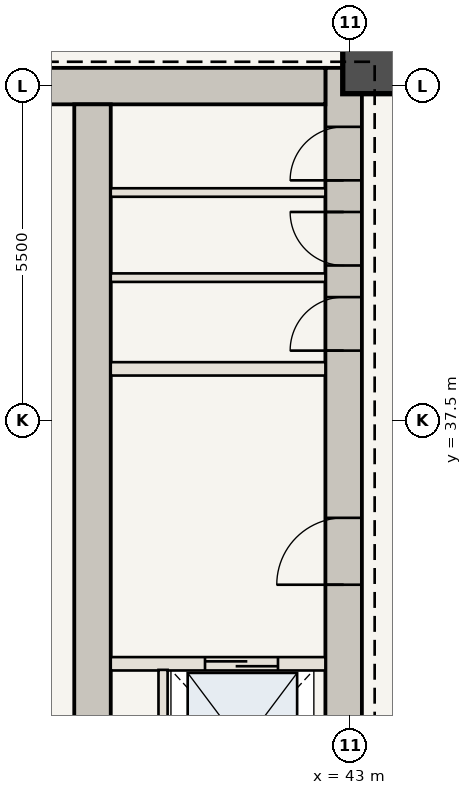
"""IFC4 building model, lengths in metres.
Left out: names, types, materials, properties, quantities, classifications, styles, units other than length and angle.
Written with IfcOpenShell. Run it as: python <this file> out.ifc"""

import sys

from ifc_helpers import new_model, si_unit, direction, frame, frame_2d, origin, origin_2d, place, context, subcontext, project, spatial, rectangle, extrude, element, fill, save


model = new_model("IFC4")
c1 = context("Model", 3, precision=1e-05, world=origin(), true_north=direction((0.0, 1.0)))
c2 = subcontext(c1, "Body", "Model", "MODEL_VIEW")
j1 = project(units=[si_unit("LENGTHUNIT", "METRE"), si_unit("PLANEANGLEUNIT", "RADIAN")], contexts=[c1])
p1 = place(None, origin())
s1 = spatial("IfcSite", under=j1, at=p1, CompositionType="ELEMENT")
p2 = place(p1, origin())
s2 = spatial("IfcBuilding", under=s1, at=p2, CompositionType="ELEMENT")
p3 = place(p2, frame((0.0, 0.0, 172.2)))
s3 = spatial("IfcBuildingStorey", under=s2, at=p3, CompositionType="ELEMENT", Elevation=172.2)
p4 = place(p3, frame((42.89, 30.6, 0.0), z_axis=(0.0, 0.0, 1.0), x_axis=(0.0, 1.0, 0.0)))
e1 = element("IfcWall", 1, at=p4, inside=s3, PredefinedType="SHEAR", context=c2, shape_type="SweptSolid", body=[
    extrude(rectangle(XDim=12.7, YDim=0.6, at=frame_2d((6.35, 0.0))), origin(), (0.0, 0.0, 1.0), 3.85),
])
p5 = place(p4, frame((4.2, 0.0, 0.0)))
e2 = element("IfcOpeningElement", 2, at=p5, cuts=e1, PredefinedType="OPENING", context=c2, shape_type="SweptSolid", body=[
    extrude(rectangle(XDim=1.1, YDim=2.15, at=frame_2d((0.55, 1.075))), frame((0.0, 0.31, 0.0), z_axis=(0.0, -1.0, 0.0), x_axis=(1.0, 0.0, 0.0)), (0.0, 0.0, 1.0), 0.62),
])
p6 = place(p4, frame((8.05, 0.0, 0.0)))
e3 = element("IfcOpeningElement", 3, at=p6, cuts=e1, PredefinedType="OPENING", context=c2, shape_type="SweptSolid", body=[
    extrude(rectangle(XDim=0.88, YDim=2.1, at=frame_2d((0.44, 1.05))), frame((0.0, 0.31, 0.0), z_axis=(0.0, -1.0, 0.0), x_axis=(1.0, 0.0, 0.0)), (0.0, 0.0, 1.0), 0.62),
])
p7 = place(p4, frame((9.45, 0.0, 0.0)))
e4 = element("IfcOpeningElement", 4, at=p7, cuts=e1, PredefinedType="OPENING", context=c2, shape_type="SweptSolid", body=[
    extrude(rectangle(XDim=0.88, YDim=2.1, at=frame_2d((0.44, 1.05))), frame((0.0, 0.31, 0.0), z_axis=(0.0, -1.0, 0.0), x_axis=(1.0, 0.0, 0.0)), (0.0, 0.0, 1.0), 0.62),
])
p8 = place(p4, frame((10.85, 0.0, 0.0)))
e5 = element("IfcOpeningElement", 5, at=p8, cuts=e1, PredefinedType="OPENING", context=c2, shape_type="SweptSolid", body=[
    extrude(rectangle(XDim=0.88, YDim=2.1, at=frame_2d((0.44, 1.05))), frame((0.0, 0.31, 0.0), z_axis=(0.0, -1.0, 0.0), x_axis=(1.0, 0.0, 0.0)), (0.0, 0.0, 1.0), 0.62),
])
p9 = place(p3, frame((37.75, 43.0, 0.0), z_axis=(0.0, 0.0, 1.0), x_axis=(1.0, 0.0, 0.0)))
e6 = element("IfcWall", 6, at=p9, inside=s3, PredefinedType="SHEAR", context=c2, shape_type="SweptSolid", body=[
    extrude(rectangle(XDim=4.84, YDim=0.6, at=frame_2d((2.42, 0.0))), origin(), (0.0, 0.0, 1.0), 3.85),
])
p10 = place(p3, frame((38.76, 30.6, 0.0), z_axis=(0.0, 0.0, 1.0), x_axis=(0.0, 1.0, 0.0)))
e7 = element("IfcWall", 7, at=p10, inside=s3, PredefinedType="SHEAR", context=c2, shape_type="SweptSolid", body=[
    extrude(rectangle(XDim=12.1, YDim=0.6, at=frame_2d((6.05, 0.0))), origin(), (0.0, 0.0, 1.0), 3.85),
])
p11 = place(p3, frame((43.35, 43.35, 0.0), z_axis=(0.0, 0.0, 1.0), x_axis=(1.0, 0.0, 0.0)))
e8 = element("IfcColumn", 8, at=p11, inside=s3, PredefinedType="COLUMN", context=c2, shape_type="SweptSolid", body=[
    extrude(rectangle(XDim=0.95, YDim=0.95, at=origin_2d()), origin(), (0.0, 0.0, 1.0), 3.85),
])
p12 = place(p3, frame((39.06, 33.5, 0.0), z_axis=(0.0, 0.0, 1.0), x_axis=(1.0, 0.0, 0.0)))
e9 = element("IfcWall", 9, at=p12, inside=s3, PredefinedType="STANDARD", context=c2, shape_type="SweptSolid", body=[
    extrude(rectangle(XDim=3.53, YDim=0.22, at=frame_2d((1.765, 0.0))), origin(), (0.0, 0.0, 1.0), 3.43),
])
p13 = place(p12, frame((1.55, 0.0, 0.0)))
e10 = element("IfcOpeningElement", 10, at=p13, cuts=e9, PredefinedType="OPENING", context=c2, shape_type="SweptSolid", body=[
    extrude(rectangle(XDim=1.2, YDim=2.2, at=frame_2d((0.6, 1.1))), frame((0.0, 0.12, 0.0), z_axis=(0.0, -1.0, 0.0), x_axis=(1.0, 0.0, 0.0)), (0.0, 0.0, 1.0), 0.24),
])
p14 = place(p3, frame((39.92, 30.75, 0.0), z_axis=(0.0, 0.0, 1.0), x_axis=(0.0, 1.0, 0.0)))
e11 = element("IfcWall", 11, at=p14, inside=s3, PredefinedType="STANDARD", context=c2, shape_type="SweptSolid", body=[
    extrude(rectangle(XDim=2.65, YDim=0.15, at=frame_2d((1.325, 0.0))), origin(), (0.0, 0.0, 1.0), 3.43),
])
p15 = place(p3, frame((39.06, 38.35, 0.0), z_axis=(0.0, 0.0, 1.0), x_axis=(1.0, 0.0, 0.0)))
e12 = element("IfcWall", 12, at=p15, inside=s3, PredefinedType="STANDARD", context=c2, shape_type="SweptSolid", body=[
    extrude(rectangle(XDim=3.53, YDim=0.22, at=frame_2d((1.765, 0.0))), origin(), (0.0, 0.0, 1.0), 3.43),
])
for number, where, z_axis, x_axis in (
    (13, (39.06, 39.85, 0.0), (0.0, 0.0, 1.0), (1.0, 0.0, 0.0)),
    (14, (39.06, 41.25, 0.0), (0.0, 0.0, 1.0), (1.0, 0.0, 0.0)),
):
    element("IfcWall", number, at=place(p3, frame(where, z_axis=z_axis, x_axis=x_axis)), inside=s3, PredefinedType="STANDARD", context=c2, shape_type="SweptSolid", body=[
        extrude(rectangle(XDim=3.53, YDim=0.14, at=frame_2d((1.765, 0.0))), origin(), (0.0, 0.0, 1.0), 3.43),
    ])
p16 = place(p5, origin())
e15 = element("IfcDoor", 15, at=p16, inside=s3, OperationType="SINGLE_SWING_LEFT", PredefinedType="DOOR", context=c2, shape_type="SweptSolid", body=[
    extrude(rectangle(XDim=1.1, YDim=2.15, at=frame_2d((0.55, 1.075))), frame((0.0, 0.025, 0.0), z_axis=(0.0, -1.0, 0.0), x_axis=(1.0, 0.0, 0.0)), (0.0, 0.0, 1.0), 0.05),
])
fill(e2, e15)
p17 = place(p6, origin())
e16 = element("IfcDoor", 16, at=p17, inside=s3, OperationType="SINGLE_SWING_LEFT", PredefinedType="DOOR", context=c2, shape_type="SweptSolid", body=[
    extrude(rectangle(XDim=0.88, YDim=2.1, at=frame_2d((0.44, 1.05))), frame((0.0, 0.025, 0.0), z_axis=(0.0, -1.0, 0.0), x_axis=(1.0, 0.0, 0.0)), (0.0, 0.0, 1.0), 0.05),
])
fill(e3, e16)
p18 = place(p7, origin())
e17 = element("IfcDoor", 17, at=p18, inside=s3, OperationType="SINGLE_SWING_RIGHT", PredefinedType="DOOR", context=c2, shape_type="SweptSolid", body=[
    extrude(rectangle(XDim=0.88, YDim=2.1, at=frame_2d((0.44, 1.05))), frame((0.0, 0.025, 0.0), z_axis=(0.0, -1.0, 0.0), x_axis=(1.0, 0.0, 0.0)), (0.0, 0.0, 1.0), 0.05),
])
fill(e4, e17)
p19 = place(p8, origin())
e18 = element("IfcDoor", 18, at=p19, inside=s3, OperationType="SINGLE_SWING_LEFT", PredefinedType="DOOR", context=c2, shape_type="SweptSolid", body=[
    extrude(rectangle(XDim=0.88, YDim=2.1, at=frame_2d((0.44, 1.05))), frame((0.0, 0.025, 0.0), z_axis=(0.0, -1.0, 0.0), x_axis=(1.0, 0.0, 0.0)), (0.0, 0.0, 1.0), 0.05),
])
fill(e5, e18)
p20 = place(p13, origin())
e19 = element("IfcDoor", 19, at=p20, inside=s3, OperationType="DOUBLE_DOOR_SLIDING", PredefinedType="DOOR", context=c2, shape_type="SweptSolid", body=[
    extrude(rectangle(XDim=1.2, YDim=2.2, at=frame_2d((0.6, 1.1))), frame((0.0, 0.025, 0.0), z_axis=(0.0, -1.0, 0.0), x_axis=(1.0, 0.0, 0.0)), (0.0, 0.0, 1.0), 0.05),
])
fill(e10, e19)
save(model, sys.argv[1])
